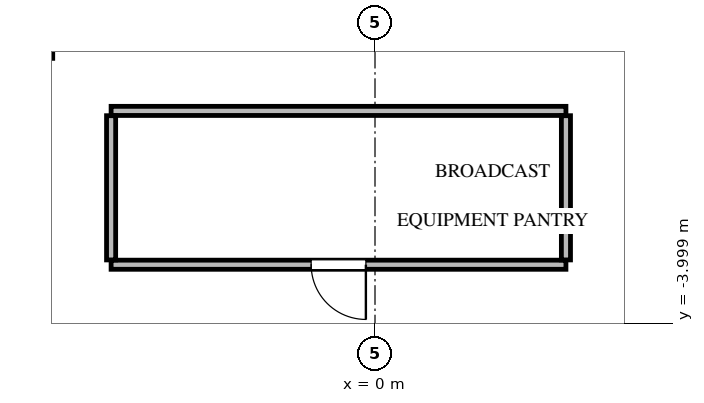
"""IFC4 building model, lengths in metres.
Left out: names, types, materials, properties, quantities, classifications, styles, units other than length and angle.
Written with IfcOpenShell. Run it as: python <this file> out.ifc"""

import sys

from ifc_helpers import new_model, si_unit, direction, frame, frame_2d, origin, place, context, subcontext, project, spatial, rectangle, extrude, source, transform, mapped, element, fill, save


model = new_model("IFC4")
c1 = context("Model", 3, precision=1e-05, world=origin(), true_north=direction((0.0, 1.0)))
c2 = subcontext(c1, "Body", "Model", "MODEL_VIEW")
j1 = project(units=[si_unit("LENGTHUNIT", "METRE"), si_unit("PLANEANGLEUNIT", "RADIAN")], contexts=[c1])
p1 = place(None, origin())
s1 = spatial("IfcSite", under=j1, at=p1, CompositionType="ELEMENT")
p2 = place(p1, origin())
s2 = spatial("IfcBuilding", under=s1, at=p2, CompositionType="ELEMENT")
p3 = place(p2, frame((0.0, 0.0, 231.5)))
s3 = spatial("IfcBuildingStorey", under=s2, at=p3, CompositionType="ELEMENT", Elevation=231.5)
p4 = place(p3, frame((-5.4, 0.354, 0.0), z_axis=(0.0, 0.0, 1.0), x_axis=(0.0, 1.0, 0.0)))
e1 = element("IfcWall", 1, at=p4, inside=s3, PredefinedType="SOLIDWALL", context=c2, shape_type="SweptSolid", body=[
    extrude(rectangle(XDim=4.026, YDim=0.2, at=frame_2d((2.013, 0.0))), origin(), (0.0, 0.0, 1.0), 3.045),
])
p5 = place(p4, frame((0.246, 0.0, 0.0)))
e2 = element("IfcOpeningElement", 2, at=p5, cuts=e1, PredefinedType="OPENING", context=c2, shape_type="SweptSolid", body=[
    extrude(rectangle(XDim=1.0, YDim=2.15, at=frame_2d((0.5, 1.075))), frame((0.0, 0.11, 0.0), z_axis=(0.0, -1.0, 0.0), x_axis=(1.0, 0.0, 0.0)), (0.0, 0.0, 1.0), 0.22),
])
p6 = place(p3, frame((3.14, -3.04, 0.0), z_axis=(0.0, 0.0, 1.0), x_axis=(-1.0, 0.0, 0.0)))
e3 = element("IfcWall", 3, at=p6, inside=s3, PredefinedType="PARTITIONING", context=c2, shape_type="SweptSolid", body=[
    extrude(rectangle(XDim=7.48, YDim=0.15, at=frame_2d((3.74, 0.0))), origin(), (0.0, 0.0, 1.0), 3.045),
])
p7 = place(p6, frame((3.29, 0.0, 0.0)))
e4 = element("IfcOpeningElement", 4, at=p7, cuts=e3, PredefinedType="OPENING", context=c2, shape_type="SweptSolid", body=[
    extrude(rectangle(XDim=0.9, YDim=2.05, at=frame_2d((0.45, 1.025))), frame((0.0, 0.085, 0.0), z_axis=(0.0, -1.0, 0.0), x_axis=(1.0, 0.0, 0.0)), (0.0, 0.0, 1.0), 0.17),
])
p8 = place(p3, frame((-4.34, -0.51, 0.0), z_axis=(0.0, 0.0, 1.0), x_axis=(1.0, 0.0, 0.0)))
e5 = element("IfcWall", 5, at=p8, inside=s3, PredefinedType="PARTITIONING", context=c2, shape_type="SweptSolid", body=[
    extrude(rectangle(XDim=7.48, YDim=0.15, at=frame_2d((3.74, 0.0))), origin(), (0.0, 0.0, 1.0), 3.045),
])
for number, where, z_axis, x_axis in (
    (6, (-4.34, -2.961, 0.0), (0.0, 0.0, 1.0), (0.0, 1.0, 0.0)),
    (7, (3.14, -0.589, 0.0), (0.0, 0.0, 1.0), (0.0, -1.0, 0.0)),
):
    element("IfcWall", number, at=place(p3, frame(where, z_axis=z_axis, x_axis=x_axis)), inside=s3, PredefinedType="PARTITIONING", context=c2, shape_type="SweptSolid", body=[
        extrude(rectangle(XDim=2.372, YDim=0.15, at=frame_2d((1.186, 0.0))), origin(), (0.0, 0.0, 1.0), 3.045),
    ])
m1 = source(origin(), c2, "Body", "SweptSolid", [
    extrude(rectangle(XDim=0.9, YDim=2.05, at=frame_2d((0.45, 1.025))), frame((0.0, 0.025, 0.0), z_axis=(0.0, -1.0, 0.0), x_axis=(1.0, 0.0, 0.0)), (0.0, 0.0, 1.0), 0.05),
])
p9 = place(p7, origin())
e8 = element("IfcDoor", 8, at=p9, inside=s3, OperationType="SINGLE_SWING_LEFT", PredefinedType="DOOR", context=c2, shape_type="MappedRepresentation", body=[
    mapped(m1, transform((0.0, 0.0, 0.0), x_axis=(1.0, 0.0, 0.0), y_axis=(0.0, 1.0, 0.0), z_axis=(0.0, 0.0, 1.0), scale=1.0)),
])
fill(e4, e8)
save(model, sys.argv[1])
